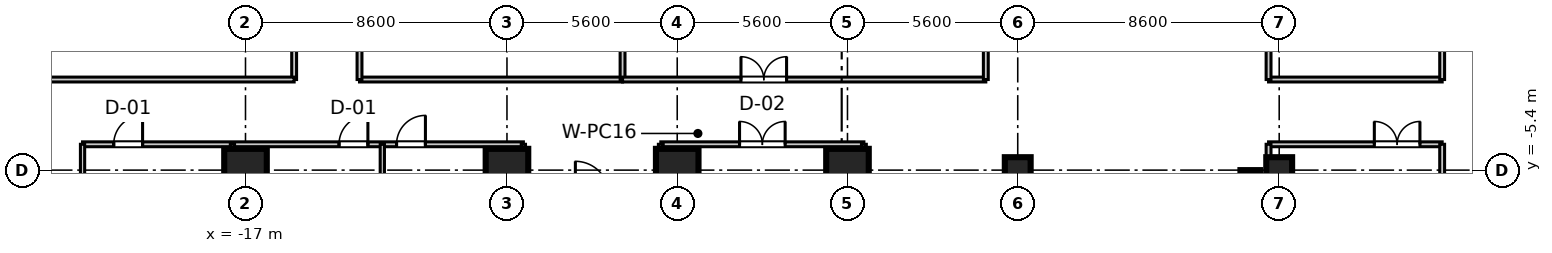
"""IFC4 building model, lengths in metres.
Left out: names, types, materials, properties, quantities, classifications, styles, units other than length and angle.
Written with IfcOpenShell. Run it as: python <this file> out.ifc"""

import sys

from ifc_helpers import new_model, si_unit, direction, frame, frame_2d, origin, origin_2d, place, context, subcontext, project, spatial, rectangle, extrude, source, transform, mapped, element, fill, save


model = new_model("IFC4")
c1 = context("Model", 3, precision=1e-05, world=origin(), true_north=direction((0.0, 1.0)))
c2 = subcontext(c1, "Body", "Model", "MODEL_VIEW")
j1 = project(units=[si_unit("LENGTHUNIT", "METRE"), si_unit("PLANEANGLEUNIT", "RADIAN")], contexts=[c1])
p1 = place(None, origin())
s1 = spatial("IfcSite", under=j1, at=p1, CompositionType="ELEMENT")
p2 = place(p1, origin())
s2 = spatial("IfcBuilding", under=s1, at=p2, CompositionType="ELEMENT")
p3 = place(p2, frame((0.0, 0.0, 32.4)))
s3 = spatial("IfcBuildingStorey", under=s2, at=p3, CompositionType="ELEMENT", Elevation=32.4)
m1 = source(origin(), c2, "Body", "SweptSolid", [
    extrude(rectangle(XDim=1.4, YDim=1.4, at=origin_2d()), origin(), (0.0, 0.0, 1.0), 3.605),
])
for number, where, z_axis, x_axis in (
    (1, (-17.0, -5.4, 0.0), (0.0, 0.0, 1.0), (1.0, 0.0, 0.0)),
    (2, (-8.4, -5.4, 0.0), (0.0, 0.0, 1.0), (1.0, 0.0, 0.0)),
    (3, (-2.8, -5.4, 0.0), (0.0, 0.0, 1.0), (1.0, 0.0, 0.0)),
    (4, (2.8, -5.4, 0.0), (0.0, 0.0, 1.0), (1.0, 0.0, 0.0)),
):
    element("IfcColumn", number, at=place(p3, frame(where, z_axis=z_axis, x_axis=x_axis)), inside=s3, PredefinedType="COLUMN", context=c2, shape_type="MappedRepresentation", body=[
        mapped(m1, transform((0.0, 0.0, 0.0), scale=1.0)),
    ])
m2 = source(origin(), c2, "Body", "SweptSolid", [
    extrude(rectangle(XDim=0.85, YDim=0.85, at=origin_2d()), origin(), (0.0, 0.0, 1.0), 3.605),
])
for number, where, z_axis, x_axis in (
    (5, (8.4, -5.4, 0.0), (0.0, 0.0, 1.0), (1.0, 0.0, 0.0)),
    (6, (17.0, -5.4, 0.0), (0.0, 0.0, 1.0), (1.0, 0.0, 0.0)),
):
    element("IfcColumn", number, at=place(p3, frame(where, z_axis=z_axis, x_axis=x_axis)), inside=s3, PredefinedType="PILASTER", context=c2, shape_type="MappedRepresentation", body=[
        mapped(m2, transform((0.0, 0.0, 0.0), scale=1.0)),
    ])
m3 = source(origin(), c2, "Body", "SweptSolid", [
    extrude(rectangle(XDim=11.6, YDim=0.65, at=frame_2d((5.8, 0.0))), origin(), (0.0, 0.0, 1.0), 3.37),
])
p4 = place(p3, frame((16.05, -17.0, 0.0), z_axis=(0.0, 0.0, 1.0), x_axis=(0.0, 1.0, 0.0)))
e7 = element("IfcWall", 7, at=p4, inside=s3, PredefinedType="SHEAR", context=c2, shape_type="MappedRepresentation", body=[
    mapped(m3, transform((0.0, 0.0, 0.0), scale=1.0)),
])
m4 = source(origin(), c2, "Body", "SweptSolid", [
    extrude(rectangle(XDim=5.71, YDim=0.16, at=frame_2d((2.855, 0.0))), origin(), (0.0, 0.0, 1.0), 2.71),
])
p5 = place(p3, frame((16.65, -4.55, 0.0), z_axis=(0.0, 0.0, 1.0), x_axis=(1.0, 0.0, 0.0)))
e8 = element("IfcWall", 8, at=p5, inside=s3, PredefinedType="PARTITIONING", context=c2, shape_type="MappedRepresentation", body=[
    mapped(m4, transform((0.0, 0.0, 0.0), scale=1.0)),
])
p6 = place(p5, frame((3.479, 0.0, 0.0)))
e9 = element("IfcOpeningElement", 9, at=p6, cuts=e8, PredefinedType="OPENING", context=c2, shape_type="SweptSolid", body=[
    extrude(rectangle(XDim=1.5, YDim=2.15, at=frame_2d((0.75, 1.075))), frame((0.0, 0.09, 0.0), z_axis=(0.0, -1.0, 0.0), x_axis=(1.0, 0.0, 0.0)), (0.0, 0.0, 1.0), 0.18),
])
m5 = source(origin(), c2, "Body", "SweptSolid", [
    extrude(rectangle(XDim=20.55, YDim=0.16, at=frame_2d((10.275, 0.0))), origin(), (0.0, 0.0, 1.0), 2.71),
])
p7 = place(p3, frame((16.65, -25.1, 0.0), z_axis=(0.0, 0.0, 1.0), x_axis=(0.0, 1.0, 0.0)))
e10 = element("IfcWall", 10, at=p7, inside=s3, PredefinedType="PARTITIONING", context=c2, shape_type="MappedRepresentation", body=[
    mapped(m5, transform((0.0, 0.0, 0.0), scale=1.0)),
])
m6 = source(origin(), c2, "Body", "SweptSolid", [
    extrude(rectangle(XDim=19.13, YDim=0.16, at=frame_2d((9.565, 0.0))), origin(), (0.0, 0.0, 1.0), 2.71),
])
p8 = place(p3, frame((22.36, -23.68, 0.0), z_axis=(0.0, 0.0, 1.0), x_axis=(0.0, 1.0, 0.0)))
e11 = element("IfcWall", 11, at=p8, inside=s3, PredefinedType="PARTITIONING", context=c2, shape_type="MappedRepresentation", body=[
    mapped(m6, transform((0.0, 0.0, 0.0), scale=1.0)),
])
m7 = source(origin(), c2, "Body", "SweptSolid", [
    extrude(rectangle(XDim=14.5, YDim=0.16, at=frame_2d((7.25, 0.0))), origin(), (0.0, 0.0, 1.0), 2.71),
])
p9 = place(p3, frame((-22.36, -4.55, 0.0), z_axis=(0.0, 0.0, 1.0), x_axis=(1.0, 0.0, 0.0)))
e12 = element("IfcWall", 12, at=p9, inside=s3, PredefinedType="PARTITIONING", context=c2, shape_type="MappedRepresentation", body=[
    mapped(m7, transform((0.0, 0.0, 0.0), scale=1.0)),
])
p10 = place(p9, frame((1.025, 0.0, 0.0)))
e13 = element("IfcOpeningElement", 13, at=p10, cuts=e12, PredefinedType="OPENING", context=c2, shape_type="SweptSolid", body=[
    extrude(rectangle(XDim=0.95, YDim=2.1, at=frame_2d((0.475, 1.05))), frame((0.0, 0.09, 0.0), z_axis=(0.0, -1.0, 0.0), x_axis=(1.0, 0.0, 0.0)), (0.0, 0.0, 1.0), 0.18),
])
p11 = place(p9, frame((8.436, 0.0, 0.0)))
e14 = element("IfcOpeningElement", 14, at=p11, cuts=e12, PredefinedType="OPENING", context=c2, shape_type="SweptSolid", body=[
    extrude(rectangle(XDim=0.95, YDim=2.1, at=frame_2d((0.475, 1.05))), frame((0.0, 0.09, 0.0), z_axis=(0.0, -1.0, 0.0), x_axis=(1.0, 0.0, 0.0)), (0.0, 0.0, 1.0), 0.18),
])
p12 = place(p9, frame((10.328, 0.0, 0.0)))
e15 = element("IfcOpeningElement", 15, at=p12, cuts=e12, PredefinedType="OPENING", context=c2, shape_type="SweptSolid", body=[
    extrude(rectangle(XDim=0.95, YDim=2.1, at=frame_2d((0.475, 1.05))), frame((0.0, 0.09, 0.0), z_axis=(0.0, -1.0, 0.0), x_axis=(1.0, 0.0, 0.0)), (0.0, 0.0, 1.0), 0.18),
])
m8 = source(origin(), c2, "Body", "SweptSolid", [
    extrude(rectangle(XDim=19.13, YDim=0.14, at=frame_2d((9.565, 0.0))), origin(), (0.0, 0.0, 1.0), 2.71),
])
p13 = place(p3, frame((-22.36, -23.68, 0.0), z_axis=(0.0, 0.0, 1.0), x_axis=(0.0, 1.0, 0.0)))
e16 = element("IfcWall", 16, at=p13, inside=s3, PredefinedType="PARTITIONING", context=c2, shape_type="MappedRepresentation", body=[
    mapped(m8, transform((0.0, 0.0, 0.0), scale=1.0)),
])
m9 = source(origin(), c2, "Body", "SweptSolid", [
    extrude(rectangle(XDim=20.55, YDim=0.14, at=frame_2d((10.275, 0.0))), origin(), (0.0, 0.0, 1.0), 2.71),
])
for number, where, z_axis, x_axis in (
    (17, (-7.86, -25.1, 0.0), (0.0, 0.0, 1.0), (0.0, 1.0, 0.0)),
    (18, (-17.43, -25.1, 0.0), (0.0, 0.0, 1.0), (0.0, 1.0, 0.0)),
    (19, (-12.5, -25.1, 0.0), (0.0, 0.0, 1.0), (0.0, 1.0, 0.0)),
):
    element("IfcWall", number, at=place(p3, frame(where, z_axis=z_axis, x_axis=x_axis)), inside=s3, PredefinedType="PARTITIONING", context=c2, shape_type="MappedRepresentation", body=[
        mapped(m9, transform((0.0, 0.0, 0.0), scale=1.0)),
    ])
m10 = source(origin(), c2, "Body", "SweptSolid", [
    extrude(rectangle(XDim=6.68, YDim=0.16, at=frame_2d((3.34, 0.0))), origin(), (0.0, 0.0, 1.0), 2.71),
])
p14 = place(p3, frame((-3.34, -4.55, 0.0), z_axis=(0.0, 0.0, 1.0), x_axis=(1.0, 0.0, 0.0)))
e20 = element("IfcWall", 20, at=p14, inside=s3, PredefinedType="PARTITIONING", context=c2, shape_type="MappedRepresentation", body=[
    mapped(m10, transform((0.0, 0.0, 0.0), scale=1.0)),
])
p15 = place(p14, frame((2.59, 0.0, 0.0)))
e21 = element("IfcOpeningElement", 21, at=p15, cuts=e20, PredefinedType="OPENING", context=c2, shape_type="SweptSolid", body=[
    extrude(rectangle(XDim=1.5, YDim=2.15, at=frame_2d((0.75, 1.075))), frame((0.0, 0.09, 0.0), z_axis=(0.0, -1.0, 0.0), x_axis=(1.0, 0.0, 0.0)), (0.0, 0.0, 1.0), 0.18),
])
for number, where, z_axis, x_axis in (
    (22, (-3.34, -25.1, 0.0), (0.0, 0.0, 1.0), (0.0, 1.0, 0.0)),
    (23, (3.34, -25.1, 0.0), (0.0, 0.0, 1.0), (0.0, 1.0, 0.0)),
):
    element("IfcWall", number, at=place(p3, frame(where, z_axis=z_axis, x_axis=x_axis)), inside=s3, PredefinedType="PARTITIONING", context=c2, shape_type="MappedRepresentation", body=[
        mapped(m5, transform((0.0, 0.0, 0.0), scale=1.0)),
    ])
m11 = source(origin(), c2, "Body", "SweptSolid", [
    extrude(rectangle(XDim=4.84, YDim=0.16, at=frame_2d((2.42, 0.0))), origin(), (0.0, 0.0, 1.0), 2.71),
])
p16 = place(p3, frame((-15.4, -2.42, 0.0), z_axis=(0.0, 0.0, 1.0), x_axis=(0.0, 1.0, 0.0)))
e24 = element("IfcWall", 24, at=p16, inside=s3, PredefinedType="PARTITIONING", context=c2, shape_type="MappedRepresentation", body=[
    mapped(m11, transform((0.0, 0.0, 0.0), scale=1.0)),
])
m12 = source(origin(), c2, "Body", "SweptSolid", [
    extrude(rectangle(XDim=9.7, YDim=0.16, at=frame_2d((4.85, 0.0))), origin(), (0.0, 0.0, 1.0), 2.71),
])
p17 = place(p3, frame((-25.1, -2.42, 0.0), z_axis=(0.0, 0.0, 1.0), x_axis=(1.0, 0.0, 0.0)))
e25 = element("IfcWall", 25, at=p17, inside=s3, PredefinedType="PARTITIONING", context=c2, shape_type="MappedRepresentation", body=[
    mapped(m12, transform((0.0, 0.0, 0.0), scale=1.0)),
])
m13 = source(origin(), c2, "Body", "SweptSolid", [
    extrude(rectangle(XDim=8.652, YDim=0.16, at=frame_2d((4.326, 0.0))), origin(), (0.0, 0.0, 1.0), 2.71),
])
p18 = place(p3, frame((-13.25, -2.42, 0.0), z_axis=(0.0, 0.0, 1.0), x_axis=(1.0, 0.0, 0.0)))
e26 = element("IfcWall", 26, at=p18, inside=s3, PredefinedType="PARTITIONING", context=c2, shape_type="MappedRepresentation", body=[
    mapped(m13, transform((0.0, 0.0, 0.0), scale=1.0)),
])
for number, where, z_axis, x_axis in (
    (27, (-13.25, -2.42, 0.0), (0.0, 0.0, 1.0), (0.0, 1.0, 0.0)),
    (28, (-4.598, -2.42, 0.0), (0.0, 0.0, 1.0), (0.0, 1.0, 0.0)),
):
    element("IfcWall", number, at=place(p3, frame(where, z_axis=z_axis, x_axis=x_axis)), inside=s3, PredefinedType="PARTITIONING", context=c2, shape_type="MappedRepresentation", body=[
        mapped(m11, transform((0.0, 0.0, 0.0), scale=1.0)),
    ])
m14 = source(origin(), c2, "Body", "SweptSolid", [
    extrude(rectangle(XDim=11.948, YDim=0.16, at=frame_2d((5.974, 0.0))), origin(), (0.0, 0.0, 1.0), 2.71),
])
p19 = place(p3, frame((-4.598, -2.42, 0.0), z_axis=(0.0, 0.0, 1.0), x_axis=(1.0, 0.0, 0.0)))
e29 = element("IfcWall", 29, at=p19, inside=s3, PredefinedType="PARTITIONING", context=c2, shape_type="MappedRepresentation", body=[
    mapped(m14, transform((0.0, 0.0, 0.0), scale=1.0)),
])
p20 = place(p19, frame((3.895, 0.0, 0.0)))
e30 = element("IfcOpeningElement", 30, at=p20, cuts=e29, PredefinedType="OPENING", context=c2, shape_type="SweptSolid", body=[
    extrude(rectangle(XDim=1.5, YDim=2.15, at=frame_2d((0.75, 1.075))), frame((0.0, 0.09, 0.0), z_axis=(0.0, -1.0, 0.0), x_axis=(1.0, 0.0, 0.0)), (0.0, 0.0, 1.0), 0.18),
])
p21 = place(p3, frame((7.35, -2.42, 0.0), z_axis=(0.0, 0.0, 1.0), x_axis=(0.0, 1.0, 0.0)))
e31 = element("IfcWall", 31, at=p21, inside=s3, PredefinedType="PARTITIONING", context=c2, shape_type="MappedRepresentation", body=[
    mapped(m11, transform((0.0, 0.0, 0.0), scale=1.0)),
])
p22 = place(p3, frame((16.65, -2.42, 0.0), z_axis=(0.0, 0.0, 1.0), x_axis=(1.0, 0.0, 0.0)))
e32 = element("IfcWall", 32, at=p22, inside=s3, PredefinedType="PARTITIONING", context=c2, shape_type="MappedRepresentation", body=[
    mapped(m4, transform((0.0, 0.0, 0.0), scale=1.0)),
])
for number, where, z_axis, x_axis in (
    (33, (16.65, -2.42, 0.0), (0.0, 0.0, 1.0), (0.0, 1.0, 0.0)),
    (34, (22.36, -2.42, 0.0), (0.0, 0.0, 1.0), (0.0, 1.0, 0.0)),
):
    element("IfcWall", number, at=place(p3, frame(where, z_axis=z_axis, x_axis=x_axis)), inside=s3, PredefinedType="PARTITIONING", context=c2, shape_type="MappedRepresentation", body=[
        mapped(m11, transform((0.0, 0.0, 0.0), scale=1.0)),
    ])
m15 = source(origin(), c2, "Body", "SweptSolid", [
    extrude(rectangle(XDim=1.5, YDim=2.15, at=frame_2d((0.75, 1.075))), frame((0.0, 0.025, 0.0), z_axis=(0.0, -1.0, 0.0), x_axis=(1.0, 0.0, 0.0)), (0.0, 0.0, 1.0), 0.05),
])
p23 = place(p6, frame((1.5, 0.0, 0.0), z_axis=(0.0, 0.0, 1.0), x_axis=(-1.0, 0.0, 0.0)))
e35 = element("IfcDoor", 35, at=p23, inside=s3, OperationType="DOUBLE_DOOR_SINGLE_SWING", PredefinedType="DOOR", context=c2, shape_type="MappedRepresentation", body=[
    mapped(m15, transform((0.0, 0.0, 0.0), scale=1.0)),
])
fill(e9, e35)
m16 = source(origin(), c2, "Body", "SweptSolid", [
    extrude(rectangle(XDim=0.95, YDim=2.1, at=frame_2d((0.475, 1.05))), frame((0.0, 0.025, 0.0), z_axis=(0.0, -1.0, 0.0), x_axis=(1.0, 0.0, 0.0)), (0.0, 0.0, 1.0), 0.05),
])
p24 = place(p10, frame((0.95, 0.0, 0.0), z_axis=(0.0, 0.0, 1.0), x_axis=(-1.0, 0.0, 0.0)))
e36 = element("IfcDoor", 36, at=p24, inside=s3, OperationType="SINGLE_SWING_RIGHT", PredefinedType="DOOR", context=c2, shape_type="MappedRepresentation", body=[
    mapped(m16, transform((0.0, 0.0, 0.0), scale=1.0)),
])
fill(e13, e36)
p25 = place(p11, frame((0.95, 0.0, 0.0), z_axis=(0.0, 0.0, 1.0), x_axis=(-1.0, 0.0, 0.0)))
e37 = element("IfcDoor", 37, at=p25, inside=s3, OperationType="SINGLE_SWING_RIGHT", PredefinedType="DOOR", context=c2, shape_type="MappedRepresentation", body=[
    mapped(m16, transform((0.0, 0.0, 0.0), scale=1.0)),
])
fill(e14, e37)
p26 = place(p12, frame((0.95, 0.0, 0.0), z_axis=(0.0, 0.0, 1.0), x_axis=(-1.0, 0.0, 0.0)))
e38 = element("IfcDoor", 38, at=p26, inside=s3, OperationType="SINGLE_SWING_RIGHT", PredefinedType="DOOR", context=c2, shape_type="MappedRepresentation", body=[
    mapped(m16, transform((0.0, 0.0, 0.0), scale=1.0)),
])
fill(e15, e38)
p27 = place(p15, frame((1.5, 0.0, 0.0), z_axis=(0.0, 0.0, 1.0), x_axis=(-1.0, 0.0, 0.0)))
e39 = element("IfcDoor", 39, at=p27, inside=s3, OperationType="DOUBLE_DOOR_SINGLE_SWING", PredefinedType="DOOR", context=c2, shape_type="MappedRepresentation", body=[
    mapped(m15, transform((0.0, 0.0, 0.0), scale=1.0)),
])
fill(e21, e39)
p28 = place(p20, origin())
e40 = element("IfcDoor", 40, at=p28, inside=s3, OperationType="DOUBLE_DOOR_SINGLE_SWING", PredefinedType="DOOR", context=c2, shape_type="MappedRepresentation", body=[
    mapped(m15, transform((0.0, 0.0, 0.0), scale=1.0)),
])
fill(e30, e40)
save(model, sys.argv[1])
